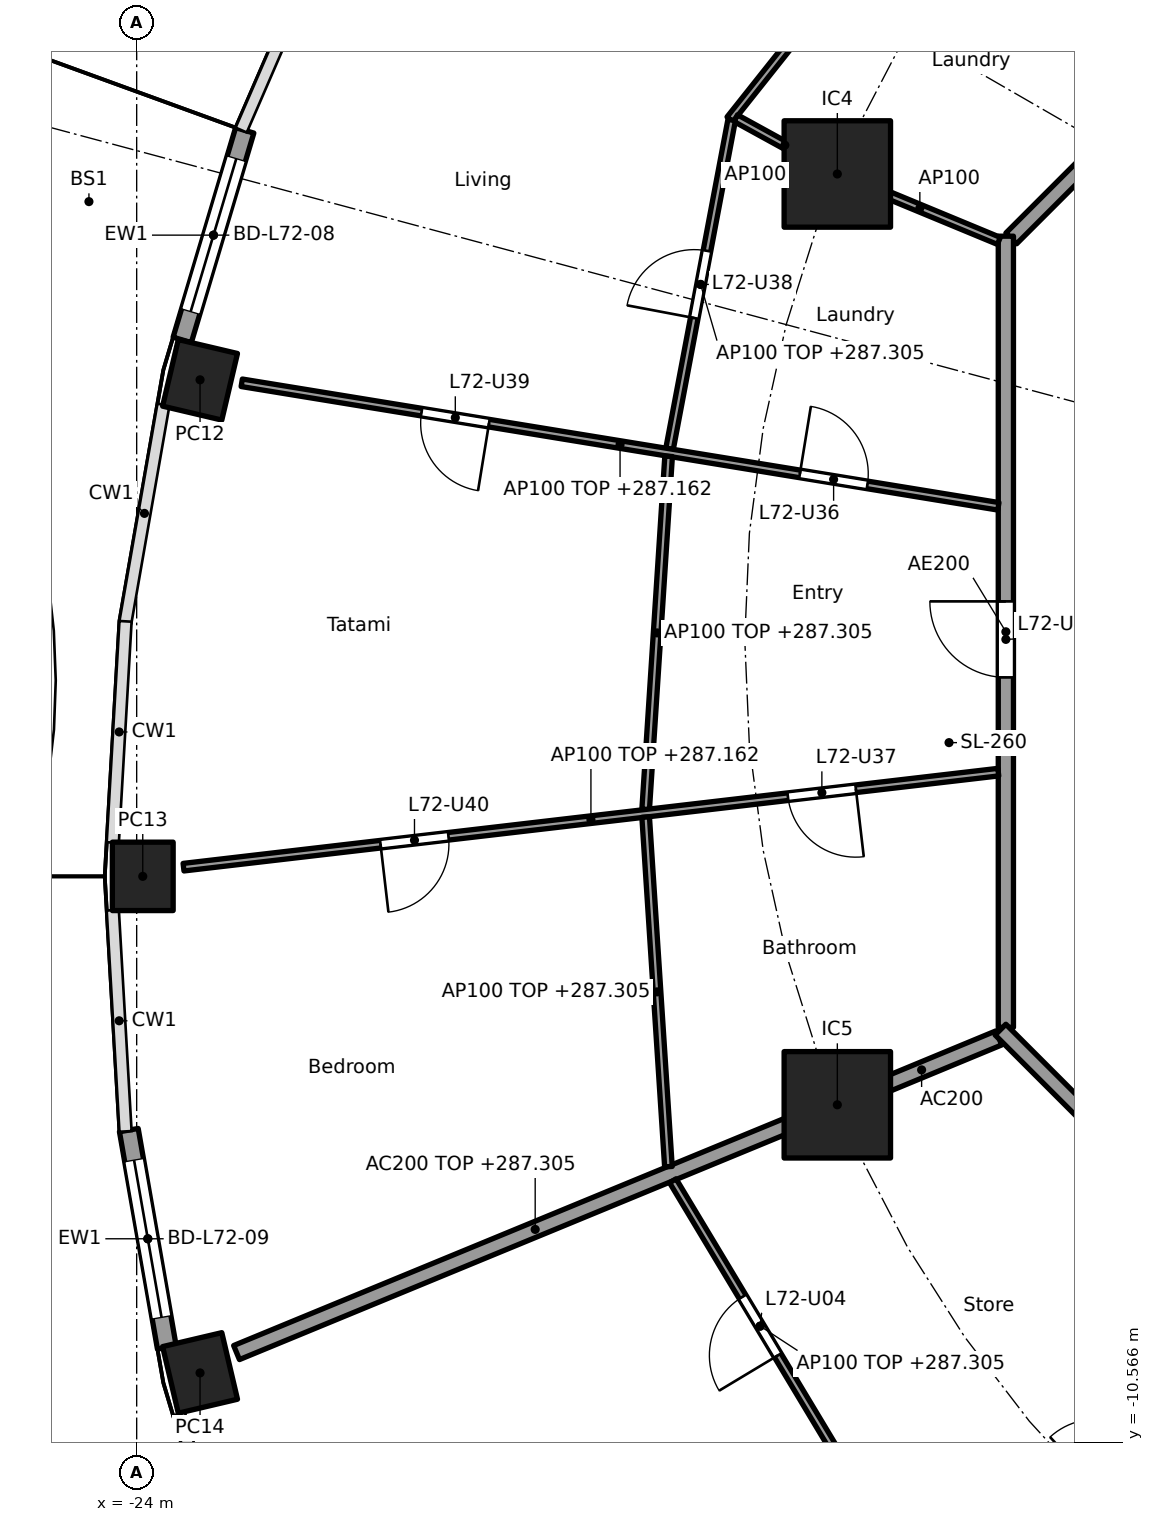
"""IFC4 building model, lengths in metres.
Left out: names, types, materials, properties, quantities, classifications, styles, units other than length and angle.
Written with IfcOpenShell. Run it as: python <this file> out.ifc"""

import sys

from ifc_helpers import new_model, si_unit, direction, frame, frame_2d, origin, origin_2d, place, context, subcontext, project, spatial, rectangle, hollow_rectangle, extrude, element, fill, save


model = new_model("IFC4")
c1 = context("Model", 3, precision=1e-05, world=origin(), true_north=direction((0.0, 1.0)))
c2 = subcontext(c1, "Body", "Model", "MODEL_VIEW")
j1 = project(units=[si_unit("LENGTHUNIT", "METRE"), si_unit("PLANEANGLEUNIT", "RADIAN")], contexts=[c1])
p1 = place(None, origin())
s1 = spatial("IfcSite", under=j1, at=p1, CompositionType="ELEMENT")
p2 = place(p1, origin())
s2 = spatial("IfcBuilding", under=s1, at=p2, CompositionType="ELEMENT")
p3 = place(p2, frame((0.0, 0.0, 284.4)))
s3 = spatial("IfcBuildingStorey", under=s2, at=p3, CompositionType="ELEMENT", Elevation=284.4)
for number, where, z_axis, x_axis in (
    (1, (-23.166, 3.415, 0.0), (0.0, 0.0, 1.0), (-0.229, -0.973, 0.0)),
    (2, (-23.92, -3.118, 0.0), (0.0, 0.0, 1.0), (0.0, -1.0, 0.0)),
    (3, (-23.166, -9.65, 0.0), (0.0, 0.0, 1.0), (0.229, -0.973, 0.0)),
):
    element("IfcColumn", number, at=place(p3, frame(where, z_axis=z_axis, x_axis=x_axis)), inside=s3, PredefinedType="COLUMN", context=c2, shape_type="SweptSolid", body=[
        extrude(hollow_rectangle(XDim=0.9, YDim=0.8, WallThickness=0.028, at=origin_2d()), origin(), (0.0, 0.0, 1.0), 3.7),
    ])
for number, where, z_axis, x_axis in (
    (4, (-14.782, 6.123, 0.0), (0.0, 0.0, 1.0), (1.0, 0.0, 0.0)),
    (5, (-14.782, -6.123, 0.0), (0.0, 0.0, 1.0), (1.0, 0.0, 0.0)),
):
    element("IfcColumn", number, at=place(p3, frame(where, z_axis=z_axis, x_axis=x_axis)), inside=s3, PredefinedType="COLUMN", context=c2, shape_type="SweptSolid", body=[
        extrude(rectangle(XDim=1.4, YDim=1.4, at=origin_2d()), origin(), (0.0, 0.0, 1.0), 3.7),
    ])
p4 = place(p3, frame((-23.401, 3.94, 0.0), z_axis=(0.0, 0.0, 1.0), x_axis=(0.285876209024, 0.9582665564, 0.0)))
e6 = element("IfcWall", 6, at=p4, inside=s3, PredefinedType="SOLIDWALL", context=c2, shape_type="SweptSolid", body=[
    extrude(rectangle(XDim=2.877, YDim=0.25, at=frame_2d((1.438, 0.0))), origin(), (0.0, 0.0, 1.0), 3.44),
])
p5 = place(p4, frame((0.389, 0.0, 0.0)))
e7 = element("IfcOpeningElement", 7, at=p5, cuts=e6, PredefinedType="OPENING", context=c2, shape_type="SweptSolid", body=[
    extrude(rectangle(XDim=2.1, YDim=2.4, at=frame_2d((1.05, 1.2))), frame((0.0, 0.135, 0.0), z_axis=(0.0, -1.0, 0.0), x_axis=(1.0, 0.0, 0.0)), (0.0, 0.0, 1.0), 0.27),
])
p6 = place(p3, frame((-23.604, -9.315, 0.0), z_axis=(0.0, 0.0, 1.0), x_axis=(-0.172182411767, 0.985065082661, 0.0)))
e8 = element("IfcWall", 8, at=p6, inside=s3, PredefinedType="SOLIDWALL", context=c2, shape_type="SweptSolid", body=[
    extrude(rectangle(XDim=2.903, YDim=0.25, at=frame_2d((1.451, 0.0))), origin(), (0.0, 0.0, 1.0), 3.44),
])
p7 = place(p6, frame((0.401, 0.0, 0.0)))
e9 = element("IfcOpeningElement", 9, at=p7, cuts=e8, PredefinedType="OPENING", context=c2, shape_type="SweptSolid", body=[
    extrude(rectangle(XDim=2.1, YDim=2.4, at=frame_2d((1.05, 1.2))), frame((0.0, 0.135, 0.0), z_axis=(0.0, -1.0, 0.0), x_axis=(1.0, 0.0, 0.0)), (0.0, 0.0, 1.0), 0.27),
])
p8 = place(p3, frame((-12.657, -5.243, 0.0), z_axis=(0.0, 0.0, 1.0), x_axis=(-0.923859888513, -0.38273085373, 0.0)))
e10 = element("IfcWall", 10, at=p8, inside=s3, PredefinedType="PARTITIONING", context=c2, shape_type="SweptSolid", body=[
    extrude(rectangle(XDim=2.199, YDim=0.2, at=frame_2d((1.1, 0.0))), origin(), (0.0, 0.0, 1.0), 3.44),
])
p9 = place(p3, frame((-14.828, -6.142, 0.0), z_axis=(0.0, 0.0, 1.0), x_axis=(-0.924478087429, -0.381235184451, 0.0)))
e11 = element("IfcWall", 11, at=p9, inside=s3, PredefinedType="PARTITIONING", context=c2, shape_type="SweptSolid", body=[
    extrude(rectangle(XDim=8.499, YDim=0.2, at=frame_2d((4.25, 0.0))), origin(), (0.0, 0.0, 1.0), 2.905),
])
p10 = place(p3, frame((-5.275, 12.494, 0.0), z_axis=(0.0, 0.0, 1.0), x_axis=(-0.707106781187, -0.707106781187, 0.0)))
e12 = element("IfcWall", 12, at=p10, inside=s3, PredefinedType="PARTITIONING", context=c2, shape_type="SweptSolid", body=[
    extrude(rectangle(XDim=10.209, YDim=0.2, at=frame_2d((5.104, 0.0))), origin(), (0.0, 0.0, 1.0), 3.44),
])
p11 = place(p3, frame((-12.565, 5.304, 0.0), z_axis=(0.0, 0.0, 1.0), x_axis=(0.0, -1.0, 0.0)))
e13 = element("IfcWall", 13, at=p11, inside=s3, PredefinedType="PARTITIONING", context=c2, shape_type="SweptSolid", body=[
    extrude(rectangle(XDim=10.409, YDim=0.2, at=frame_2d((5.205, 0.0))), origin(), (0.0, 0.0, 1.0), 3.44),
])
p12 = place(p11, frame((4.804, 0.0, 0.0)))
e14 = element("IfcOpeningElement", 14, at=p12, cuts=e13, PredefinedType="OPENING", context=c2, shape_type="SweptSolid", body=[
    extrude(rectangle(XDim=1.0, YDim=2.1, at=frame_2d((0.5, 1.05))), frame((0.0, 0.11, 0.0), z_axis=(0.0, -1.0, 0.0), x_axis=(1.0, 0.0, 0.0)), (0.0, 0.0, 1.0), 0.22),
])
p13 = place(p3, frame((-12.635, -5.134, 0.0), z_axis=(0.0, 0.0, 1.0), x_axis=(0.707106781187, -0.707106781187, 0.0)))
e15 = element("IfcWall", 15, at=p13, inside=s3, PredefinedType="PARTITIONING", context=c2, shape_type="SweptSolid", body=[
    extrude(rectangle(XDim=10.609, YDim=0.2, at=frame_2d((5.305, 0.0))), origin(), (0.0, 0.0, 1.0), 3.44),
])
p14 = place(p13, frame((6.539, 0.0, 0.0)))
e16 = element("IfcOpeningElement", 16, at=p14, cuts=e15, PredefinedType="OPENING", context=c2, shape_type="SweptSolid", body=[
    extrude(rectangle(XDim=1.0, YDim=2.1, at=frame_2d((0.5, 1.05))), frame((0.0, 0.11, 0.0), z_axis=(0.0, -1.0, 0.0), x_axis=(1.0, 0.0, 0.0)), (0.0, 0.0, 1.0), 0.22),
])
p15 = place(p3, frame((-10.183, 7.727, 0.0), z_axis=(0.0, 0.0, 1.0), x_axis=(-0.719063433856, 0.694944442449, 0.0)))
e17 = element("IfcWall", 17, at=p15, inside=s3, PredefinedType="PARTITIONING", context=c2, shape_type="SweptSolid", body=[
    extrude(rectangle(XDim=9.535, YDim=0.1, at=frame_2d((4.768, 0.0))), origin(), (0.0, 0.0, 1.0), 2.762),
])
p16 = place(p15, frame((6.405, 0.0, 0.0)))
e18 = element("IfcOpeningElement", 18, at=p16, cuts=e17, PredefinedType="OPENING", context=c2, shape_type="SweptSolid", body=[
    extrude(rectangle(XDim=0.9, YDim=2.1, at=frame_2d((0.45, 1.05))), frame((0.0, 0.06, 0.0), z_axis=(0.0, -1.0, 0.0), x_axis=(1.0, 0.0, 0.0)), (0.0, 0.0, 1.0), 0.12),
])
p17 = place(p15, frame((1.637, 0.0, 0.0)))
e19 = element("IfcOpeningElement", 19, at=p17, cuts=e17, PredefinedType="OPENING", context=c2, shape_type="SweptSolid", body=[
    extrude(rectangle(XDim=0.9, YDim=2.1, at=frame_2d((0.45, 1.05))), frame((0.0, 0.06, 0.0), z_axis=(0.0, -1.0, 0.0), x_axis=(1.0, 0.0, 0.0)), (0.0, 0.0, 1.0), 0.12),
])
p18 = place(p3, frame((-13.216, 10.589, 0.0), z_axis=(0.0, 0.0, 1.0), x_axis=(-0.622272178674, -0.782800955319, 0.0)))
e20 = element("IfcWall", 20, at=p18, inside=s3, PredefinedType="PARTITIONING", context=c2, shape_type="SweptSolid", body=[
    extrude(rectangle(XDim=4.786, YDim=0.1, at=frame_2d((2.393, 0.0))), origin(), (0.0, 0.0, 1.0), 2.905),
])
p19 = place(p18, frame((1.918, 0.0, 0.0)))
e21 = element("IfcOpeningElement", 21, at=p19, cuts=e20, PredefinedType="OPENING", context=c2, shape_type="SweptSolid", body=[
    extrude(rectangle(XDim=0.9, YDim=2.1, at=frame_2d((0.45, 1.05))), frame((0.0, 0.06, 0.0), z_axis=(0.0, -1.0, 0.0), x_axis=(1.0, 0.0, 0.0)), (0.0, 0.0, 1.0), 0.12),
])
p20 = place(p3, frame((-12.657, 5.243, 0.0), z_axis=(0.0, 0.0, 1.0), x_axis=(-0.923864733477, 0.382719158442, 0.0)))
e22 = element("IfcWall", 22, at=p20, inside=s3, PredefinedType="PARTITIONING", context=c2, shape_type="SweptSolid", body=[
    extrude(rectangle(XDim=2.25, YDim=0.1, at=frame_2d((1.125, 0.0))), origin(), (0.0, 0.0, 1.0), 3.44),
])
p21 = place(p3, frame((-14.826, 6.147, 0.0), z_axis=(0.0, 0.0, 1.0), x_axis=(-0.876411496923, 0.481562963755, 0.0)))
e23 = element("IfcWall", 23, at=p21, inside=s3, PredefinedType="PARTITIONING", context=c2, shape_type="SweptSolid", body=[
    extrude(rectangle(XDim=1.475, YDim=0.1, at=frame_2d((0.738, 0.0))), origin(), (0.0, 0.0, 1.0), 3.44),
])
p22 = place(p3, frame((-16.172, 6.832, 0.0), z_axis=(0.0, 0.0, 1.0), x_axis=(-0.185671645069, -0.982611846162, 0.0)))
e24 = element("IfcWall", 24, at=p22, inside=s3, PredefinedType="PARTITIONING", context=c2, shape_type="SweptSolid", body=[
    extrude(rectangle(XDim=4.401, YDim=0.1, at=frame_2d((2.2, 0.0))), origin(), (0.0, 0.0, 1.0), 2.905),
])
p23 = place(p22, frame((1.75, 0.0, 0.0)))
e25 = element("IfcOpeningElement", 25, at=p23, cuts=e24, PredefinedType="OPENING", context=c2, shape_type="SweptSolid", body=[
    extrude(rectangle(XDim=0.9, YDim=2.1, at=frame_2d((0.45, 1.05))), frame((0.0, 0.06, 0.0), z_axis=(0.0, -1.0, 0.0), x_axis=(1.0, 0.0, 0.0)), (0.0, 0.0, 1.0), 0.12),
])
p24 = place(p3, frame((-12.664, 1.751, 0.0), z_axis=(0.0, 0.0, 1.0), x_axis=(-0.986935394566, 0.161116501183, 0.0)))
e26 = element("IfcWall", 26, at=p24, inside=s3, PredefinedType="PARTITIONING", context=c2, shape_type="SweptSolid", body=[
    extrude(rectangle(XDim=10.086, YDim=0.1, at=frame_2d((5.043, 0.0))), origin(), (0.0, 0.0, 1.0), 2.762),
])
p25 = place(p24, frame((1.746, 0.0, 0.0)))
e27 = element("IfcOpeningElement", 27, at=p25, cuts=e26, PredefinedType="OPENING", context=c2, shape_type="SweptSolid", body=[
    extrude(rectangle(XDim=0.9, YDim=2.1, at=frame_2d((0.45, 1.05))), frame((0.0, 0.06, 0.0), z_axis=(0.0, -1.0, 0.0), x_axis=(1.0, 0.0, 0.0)), (0.0, 0.0, 1.0), 0.12),
])
p26 = place(p24, frame((6.789, 0.0, 0.0)))
e28 = element("IfcOpeningElement", 28, at=p26, cuts=e26, PredefinedType="OPENING", context=c2, shape_type="SweptSolid", body=[
    extrude(rectangle(XDim=0.9, YDim=2.1, at=frame_2d((0.45, 1.05))), frame((0.0, 0.06, 0.0), z_axis=(0.0, -1.0, 0.0), x_axis=(1.0, 0.0, 0.0)), (0.0, 0.0, 1.0), 0.12),
])
p27 = place(p3, frame((-17.002, 2.409, 0.0), z_axis=(0.0, 0.0, 1.0), x_axis=(-0.064855550758, -0.997894662545, 0.0)))
e29 = element("IfcWall", 29, at=p27, inside=s3, PredefinedType="PARTITIONING", context=c2, shape_type="SweptSolid", body=[
    extrude(rectangle(XDim=4.656, YDim=0.1, at=frame_2d((2.328, 0.0))), origin(), (0.0, 0.0, 1.0), 2.905),
])
p28 = place(p3, frame((-12.664, -1.746, 0.0), z_axis=(0.0, 0.0, 1.0), x_axis=(-0.993264397529, -0.115869912409, 0.0)))
e30 = element("IfcWall", 30, at=p28, inside=s3, PredefinedType="PARTITIONING", context=c2, shape_type="SweptSolid", body=[
    extrude(rectangle(XDim=10.792, YDim=0.1, at=frame_2d((5.396, 0.0))), origin(), (0.0, 0.0, 1.0), 2.762),
])
p29 = place(p28, frame((1.887, 0.0, 0.0)))
e31 = element("IfcOpeningElement", 31, at=p29, cuts=e30, PredefinedType="OPENING", context=c2, shape_type="SweptSolid", body=[
    extrude(rectangle(XDim=0.9, YDim=2.1, at=frame_2d((0.45, 1.05))), frame((0.0, 0.06, 0.0), z_axis=(0.0, -1.0, 0.0), x_axis=(1.0, 0.0, 0.0)), (0.0, 0.0, 1.0), 0.12),
])
p30 = place(p28, frame((7.283, 0.0, 0.0)))
e32 = element("IfcOpeningElement", 32, at=p30, cuts=e30, PredefinedType="OPENING", context=c2, shape_type="SweptSolid", body=[
    extrude(rectangle(XDim=0.9, YDim=2.1, at=frame_2d((0.45, 1.05))), frame((0.0, 0.06, 0.0), z_axis=(0.0, -1.0, 0.0), x_axis=(1.0, 0.0, 0.0)), (0.0, 0.0, 1.0), 0.12),
])
p31 = place(p3, frame((-17.304, -2.338, 0.0), z_axis=(0.0, 0.0, 1.0), x_axis=(0.06500001157, -0.997885263192, 0.0)))
e33 = element("IfcWall", 33, at=p31, inside=s3, PredefinedType="PARTITIONING", context=c2, shape_type="SweptSolid", body=[
    extrude(rectangle(XDim=4.609, YDim=0.1, at=frame_2d((2.304, 0.0))), origin(), (0.0, 0.0, 1.0), 2.905),
])
p32 = place(p3, frame((-16.946, -7.122, 0.0), z_axis=(0.0, 0.0, 1.0), x_axis=(0.514994556856, -0.857193447483, 0.0)))
e34 = element("IfcWall", 34, at=p32, inside=s3, PredefinedType="PARTITIONING", context=c2, shape_type="SweptSolid", body=[
    extrude(rectangle(XDim=4.462, YDim=0.1, at=frame_2d((2.231, 0.0))), origin(), (0.0, 0.0, 1.0), 2.905),
])
p33 = place(p32, frame((1.781, 0.0, 0.0)))
e35 = element("IfcOpeningElement", 35, at=p33, cuts=e34, PredefinedType="OPENING", context=c2, shape_type="SweptSolid", body=[
    extrude(rectangle(XDim=0.9, YDim=2.1, at=frame_2d((0.45, 1.05))), frame((0.0, 0.06, 0.0), z_axis=(0.0, -1.0, 0.0), x_axis=(1.0, 0.0, 0.0)), (0.0, 0.0, 1.0), 0.12),
])
p34 = place(p3, frame((-8.958, -8.952, 0.0), z_axis=(0.0, 0.0, 1.0), x_axis=(-0.73876526954, -0.673962815385, 0.0)))
e36 = element("IfcWall", 36, at=p34, inside=s3, PredefinedType="PARTITIONING", context=c2, shape_type="SweptSolid", body=[
    extrude(rectangle(XDim=5.647, YDim=0.1, at=frame_2d((2.824, 0.0))), origin(), (0.0, 0.0, 1.0), 2.762),
])
p35 = place(p34, frame((2.374, 0.0, 0.0)))
e37 = element("IfcOpeningElement", 37, at=p35, cuts=e36, PredefinedType="OPENING", context=c2, shape_type="SweptSolid", body=[
    extrude(rectangle(XDim=0.9, YDim=2.1, at=frame_2d((0.45, 1.05))), frame((0.0, 0.06, 0.0), z_axis=(0.0, -1.0, 0.0), x_axis=(1.0, 0.0, 0.0)), (0.0, 0.0, 1.0), 0.12),
])
p36 = place(p5, origin())
e38 = element("IfcDoor", 38, at=p36, inside=s3, OperationType="SLIDING_TO_LEFT", PredefinedType="DOOR", context=c2, shape_type="SweptSolid", body=[
    extrude(rectangle(XDim=2.1, YDim=2.4, at=frame_2d((1.05, 1.2))), frame((0.0, 0.025, 0.0), z_axis=(0.0, -1.0, 0.0), x_axis=(1.0, 0.0, 0.0)), (0.0, 0.0, 1.0), 0.05),
])
fill(e7, e38)
p37 = place(p7, origin())
e39 = element("IfcDoor", 39, at=p37, inside=s3, OperationType="SLIDING_TO_LEFT", PredefinedType="DOOR", context=c2, shape_type="SweptSolid", body=[
    extrude(rectangle(XDim=2.1, YDim=2.4, at=frame_2d((1.05, 1.2))), frame((0.0, 0.025, 0.0), z_axis=(0.0, -1.0, 0.0), x_axis=(1.0, 0.0, 0.0)), (0.0, 0.0, 1.0), 0.05),
])
fill(e9, e39)
p38 = place(p33, frame((0.9, 0.0, 0.0), x_axis=(-1.0, 0.0, 0.0)))
e40 = element("IfcDoor", 40, at=p38, inside=s3, OperationType="SINGLE_SWING_LEFT", PredefinedType="DOOR", context=c2, shape_type="SweptSolid", body=[
    extrude(rectangle(XDim=0.9, YDim=2.1, at=frame_2d((0.45, 1.05))), frame((0.0, 0.025, 0.0), z_axis=(0.0, -1.0, 0.0), x_axis=(1.0, 0.0, 0.0)), (0.0, 0.0, 1.0), 0.05),
])
fill(e35, e40)
p39 = place(p12, frame((1.0, 0.0, 0.0), x_axis=(-1.0, 0.0, 0.0)))
e41 = element("IfcDoor", 41, at=p39, inside=s3, OperationType="SINGLE_SWING_RIGHT", PredefinedType="DOOR", context=c2, shape_type="SweptSolid", body=[
    extrude(rectangle(XDim=1.0, YDim=2.1, at=frame_2d((0.5, 1.05))), frame((0.0, 0.025, 0.0), z_axis=(0.0, -1.0, 0.0), x_axis=(1.0, 0.0, 0.0)), (0.0, 0.0, 1.0), 0.05),
])
fill(e14, e41)
p40 = place(p25, frame((0.9, 0.0, 0.0), x_axis=(-1.0, 0.0, 0.0)))
e42 = element("IfcDoor", 42, at=p40, inside=s3, OperationType="SINGLE_SWING_LEFT", PredefinedType="DOOR", context=c2, shape_type="SweptSolid", body=[
    extrude(rectangle(XDim=0.9, YDim=2.1, at=frame_2d((0.45, 1.05))), frame((0.0, 0.025, 0.0), z_axis=(0.0, -1.0, 0.0), x_axis=(1.0, 0.0, 0.0)), (0.0, 0.0, 1.0), 0.05),
])
fill(e27, e42)
p41 = place(p29, origin())
e43 = element("IfcDoor", 43, at=p41, inside=s3, OperationType="SINGLE_SWING_LEFT", PredefinedType="DOOR", context=c2, shape_type="SweptSolid", body=[
    extrude(rectangle(XDim=0.9, YDim=2.1, at=frame_2d((0.45, 1.05))), frame((0.0, 0.025, 0.0), z_axis=(0.0, -1.0, 0.0), x_axis=(1.0, 0.0, 0.0)), (0.0, 0.0, 1.0), 0.05),
])
fill(e31, e43)
p42 = place(p23, frame((0.9, 0.0, 0.0), x_axis=(-1.0, 0.0, 0.0)))
e44 = element("IfcDoor", 44, at=p42, inside=s3, OperationType="SINGLE_SWING_LEFT", PredefinedType="DOOR", context=c2, shape_type="SweptSolid", body=[
    extrude(rectangle(XDim=0.9, YDim=2.1, at=frame_2d((0.45, 1.05))), frame((0.0, 0.025, 0.0), z_axis=(0.0, -1.0, 0.0), x_axis=(1.0, 0.0, 0.0)), (0.0, 0.0, 1.0), 0.05),
])
fill(e25, e44)
p43 = place(p26, origin())
e45 = element("IfcDoor", 45, at=p43, inside=s3, OperationType="SINGLE_SWING_LEFT", PredefinedType="DOOR", context=c2, shape_type="SweptSolid", body=[
    extrude(rectangle(XDim=0.9, YDim=2.1, at=frame_2d((0.45, 1.05))), frame((0.0, 0.025, 0.0), z_axis=(0.0, -1.0, 0.0), x_axis=(1.0, 0.0, 0.0)), (0.0, 0.0, 1.0), 0.05),
])
fill(e28, e45)
p44 = place(p30, origin())
e46 = element("IfcDoor", 46, at=p44, inside=s3, OperationType="SINGLE_SWING_RIGHT", PredefinedType="DOOR", context=c2, shape_type="SweptSolid", body=[
    extrude(rectangle(XDim=0.9, YDim=2.1, at=frame_2d((0.45, 1.05))), frame((0.0, 0.025, 0.0), z_axis=(0.0, -1.0, 0.0), x_axis=(1.0, 0.0, 0.0)), (0.0, 0.0, 1.0), 0.05),
])
fill(e32, e46)
save(model, sys.argv[1])
